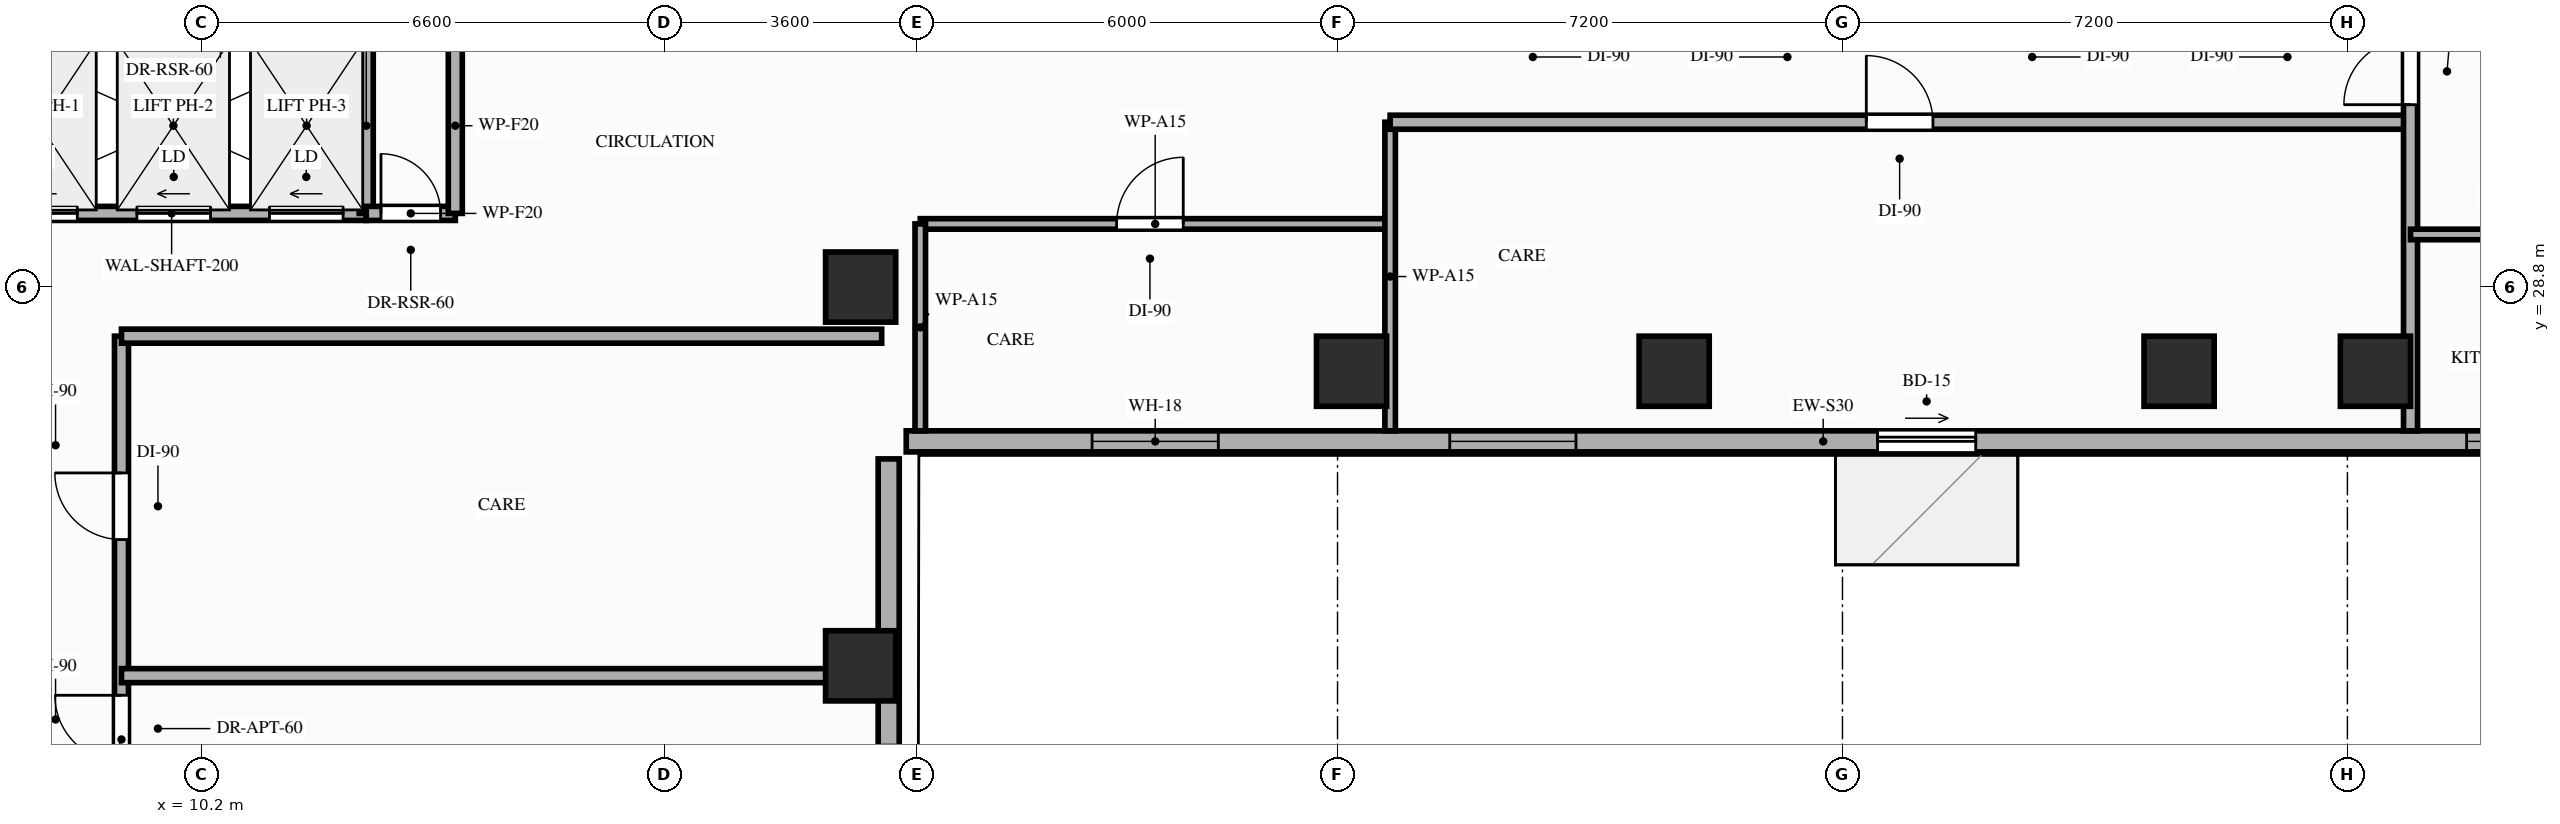
"""IFC4 building model, lengths in metres.
Left out: names, types, materials, properties, quantities, classifications, styles, units other than length and angle.
Written with IfcOpenShell. Run it as: python <this file> out.ifc"""

import sys

from ifc_helpers import new_model, si_unit, direction, frame, frame_2d, origin, origin_2d, place, context, subcontext, project, spatial, rectangle, extrude, element, fill, save


model = new_model("IFC4")
c1 = context("Model", 3, precision=1e-05, world=origin(), true_north=direction((0.0, 1.0)))
c2 = subcontext(c1, "Body", "Model", "MODEL_VIEW")
j1 = project(units=[si_unit("LENGTHUNIT", "METRE"), si_unit("PLANEANGLEUNIT", "RADIAN")], contexts=[c1])
p1 = place(None, origin())
s1 = spatial("IfcSite", under=j1, at=p1, CompositionType="ELEMENT")
p2 = place(p1, origin())
s2 = spatial("IfcBuilding", under=s1, at=p2, CompositionType="ELEMENT")
p3 = place(p2, frame((0.0, 0.0, 152.2)))
s3 = spatial("IfcBuildingStorey", under=s2, at=p3, CompositionType="ELEMENT", Elevation=152.2)
for number, where, z_axis, x_axis in (
    (1, (19.6, 23.4, 0.0), (0.0, 0.0, 1.0), (1.0, 0.0, 0.0)),
    (2, (19.6, 28.8, 0.0), (0.0, 0.0, 1.0), (1.0, 0.0, 0.0)),
    (3, (26.6, 27.6, 0.0), (0.0, 0.0, 1.0), (1.0, 0.0, 0.0)),
    (4, (31.2, 27.6, 0.0), (0.0, 0.0, 1.0), (1.0, 0.0, 0.0)),
    (5, (38.4, 27.6, 0.0), (0.0, 0.0, 1.0), (1.0, 0.0, 0.0)),
    (6, (41.2, 27.6, 0.0), (0.0, 0.0, 1.0), (1.0, 0.0, 0.0)),
):
    element("IfcColumn", number, at=place(p3, frame(where, z_axis=z_axis, x_axis=x_axis)), inside=s3, PredefinedType="COLUMN", context=c2, shape_type="SweptSolid", body=[
        extrude(rectangle(XDim=1.0, YDim=1.0, at=origin_2d()), origin(), (0.0, 0.0, 1.0), 3.8),
    ])
p4 = place(p3, frame((20.0, 8.8, 0.0), z_axis=(0.0, 0.0, 1.0), x_axis=(0.0, 1.0, 0.0)))
e7 = element("IfcWall", 7, at=p4, inside=s3, PredefinedType="STANDARD", context=c2, shape_type="SweptSolid", body=[
    extrude(rectangle(XDim=17.55, YDim=0.3, at=frame_2d((8.775, 0.0))), origin(), (0.0, 0.0, 1.0), 2.99),
])
p5 = place(p4, frame((11.67, 0.0, 0.85)))
e8 = element("IfcOpeningElement", 8, at=p5, cuts=e7, PredefinedType="OPENING", context=c2, shape_type="SweptSolid", body=[
    extrude(rectangle(XDim=1.8, YDim=1.75, at=frame_2d((0.9, 0.875))), frame((0.0, 0.16, 0.0), z_axis=(0.0, -1.0, 0.0), x_axis=(1.0, 0.0, 0.0)), (0.0, 0.0, 1.0), 0.32),
])
p6 = place(p4, frame((5.6, 0.0, 0.85)))
e9 = element("IfcOpeningElement", 9, at=p6, cuts=e7, PredefinedType="OPENING", context=c2, shape_type="SweptSolid", body=[
    extrude(rectangle(XDim=1.8, YDim=1.75, at=frame_2d((0.9, 0.875))), frame((0.0, 0.16, 0.0), z_axis=(0.0, -1.0, 0.0), x_axis=(1.0, 0.0, 0.0)), (0.0, 0.0, 1.0), 0.32),
])
p7 = place(p3, frame((20.25, 26.6, 0.0), z_axis=(0.0, 0.0, 1.0), x_axis=(1.0, 0.0, 0.0)))
e10 = element("IfcWall", 10, at=p7, inside=s3, PredefinedType="STANDARD", context=c2, shape_type="SweptSolid", body=[
    extrude(rectangle(XDim=26.15, YDim=0.3, at=frame_2d((13.075, 0.0))), origin(), (0.0, 0.0, 1.0), 3.56),
])
p8 = place(p7, frame((13.85, 0.0, 0.0)))
e11 = element("IfcOpeningElement", 11, at=p8, cuts=e10, PredefinedType="OPENING", context=c2, shape_type="SweptSolid", body=[
    extrude(rectangle(XDim=1.4, YDim=2.1, at=frame_2d((0.7, 1.05))), frame((0.0, 0.16, 0.0), z_axis=(0.0, -1.0, 0.0), x_axis=(1.0, 0.0, 0.0)), (0.0, 0.0, 1.0), 0.32),
])
p9 = place(p7, frame((2.65, 0.0, 0.85)))
e12 = element("IfcOpeningElement", 12, at=p9, cuts=e10, PredefinedType="OPENING", context=c2, shape_type="SweptSolid", body=[
    extrude(rectangle(XDim=1.8, YDim=1.75, at=frame_2d((0.9, 0.875))), frame((0.0, 0.16, 0.0), z_axis=(0.0, -1.0, 0.0), x_axis=(1.0, 0.0, 0.0)), (0.0, 0.0, 1.0), 0.32),
])
p10 = place(p7, frame((7.75, 0.0, 0.85)))
e13 = element("IfcOpeningElement", 13, at=p10, cuts=e10, PredefinedType="OPENING", context=c2, shape_type="SweptSolid", body=[
    extrude(rectangle(XDim=1.8, YDim=1.75, at=frame_2d((0.9, 0.875))), frame((0.0, 0.16, 0.0), z_axis=(0.0, -1.0, 0.0), x_axis=(1.0, 0.0, 0.0)), (0.0, 0.0, 1.0), 0.32),
])
p11 = place(p7, frame((22.25, 0.0, 0.85)))
e14 = element("IfcOpeningElement", 14, at=p11, cuts=e10, PredefinedType="OPENING", context=c2, shape_type="SweptSolid", body=[
    extrude(rectangle(XDim=1.8, YDim=1.75, at=frame_2d((0.9, 0.875))), frame((0.0, 0.16, 0.0), z_axis=(0.0, -1.0, 0.0), x_axis=(1.0, 0.0, 0.0)), (0.0, 0.0, 1.0), 0.32),
])
p12 = place(p3, frame((7.0, 29.85, 0.0), z_axis=(0.0, 0.0, 1.0), x_axis=(1.0, 0.0, 0.0)))
e15 = element("IfcWall", 15, at=p12, inside=s3, PredefinedType="MOVABLE", context=c2, shape_type="SweptSolid", body=[
    extrude(rectangle(XDim=5.55, YDim=0.2, at=frame_2d((2.775, 0.0))), origin(), (0.0, 0.0, 1.0), 3.56),
])
p13 = place(p12, frame((0.38, 0.0, 0.0)))
e16 = element("IfcOpeningElement", 16, at=p13, cuts=e15, PredefinedType="OPENING", context=c2, shape_type="SweptSolid", body=[
    extrude(rectangle(XDim=1.05, YDim=2.15, at=frame_2d((0.525, 1.075))), frame((0.0, 0.11, 0.0), z_axis=(0.0, -1.0, 0.0), x_axis=(1.0, 0.0, 0.0)), (0.0, 0.0, 1.0), 0.22),
])
p14 = place(p12, frame((2.28, 0.0, 0.0)))
e17 = element("IfcOpeningElement", 17, at=p14, cuts=e15, PredefinedType="OPENING", context=c2, shape_type="SweptSolid", body=[
    extrude(rectangle(XDim=1.05, YDim=2.15, at=frame_2d((0.525, 1.075))), frame((0.0, 0.11, 0.0), z_axis=(0.0, -1.0, 0.0), x_axis=(1.0, 0.0, 0.0)), (0.0, 0.0, 1.0), 0.22),
])
p15 = place(p12, frame((4.17, 0.0, 0.0)))
e18 = element("IfcOpeningElement", 18, at=p15, cuts=e15, PredefinedType="OPENING", context=c2, shape_type="SweptSolid", body=[
    extrude(rectangle(XDim=1.05, YDim=2.15, at=frame_2d((0.525, 1.075))), frame((0.0, 0.11, 0.0), z_axis=(0.0, -1.0, 0.0), x_axis=(1.0, 0.0, 0.0)), (0.0, 0.0, 1.0), 0.22),
])
p16 = place(p3, frame((12.55, 29.85, 0.0), z_axis=(0.0, 0.0, 1.0), x_axis=(0.0, 1.0, 0.0)))
e19 = element("IfcWall", 19, at=p16, inside=s3, PredefinedType="MOVABLE", context=c2, shape_type="SweptSolid", body=[
    extrude(rectangle(XDim=2.5, YDim=0.2, at=frame_2d((1.25, 0.0))), origin(), (0.0, 0.0, 1.0), 3.56),
])
p17 = place(p3, frame((12.55, 29.85, 0.0), z_axis=(0.0, 0.0, 1.0), x_axis=(1.0, 0.0, 0.0)))
e20 = element("IfcWall", 20, at=p17, inside=s3, PredefinedType="PARTITIONING", context=c2, shape_type="SweptSolid", body=[
    extrude(rectangle(XDim=1.27, YDim=0.2, at=frame_2d((0.635, 0.0))), origin(), (0.0, 0.0, 1.0), 3.56),
])
p18 = place(p17, frame((0.21, 0.0, 0.0)))
e21 = element("IfcOpeningElement", 21, at=p18, cuts=e20, PredefinedType="OPENING", context=c2, shape_type="SweptSolid", body=[
    extrude(rectangle(XDim=0.85, YDim=2.05, at=frame_2d((0.425, 1.025))), frame((0.0, 0.11, 0.0), z_axis=(0.0, -1.0, 0.0), x_axis=(1.0, 0.0, 0.0)), (0.0, 0.0, 1.0), 0.22),
])
p19 = place(p3, frame((13.82, 29.85, 0.0), z_axis=(0.0, 0.0, 1.0), x_axis=(0.0, 1.0, 0.0)))
e22 = element("IfcWall", 22, at=p19, inside=s3, PredefinedType="PARTITIONING", context=c2, shape_type="SweptSolid", body=[
    extrude(rectangle(XDim=2.5, YDim=0.2, at=frame_2d((1.25, 0.0))), origin(), (0.0, 0.0, 1.0), 3.56),
])
p20 = place(p3, frame((9.06, 16.6, 0.0), z_axis=(0.0, 0.0, 1.0), x_axis=(0.0, 1.0, 0.0)))
e23 = element("IfcWall", 23, at=p20, inside=s3, PredefinedType="PARTITIONING", context=c2, shape_type="SweptSolid", body=[
    extrude(rectangle(XDim=11.5, YDim=0.2, at=frame_2d((5.75, 0.0))), origin(), (0.0, 0.0, 1.0), 2.99),
])
p21 = place(p20, frame((0.45, 0.0, 0.0)))
e24 = element("IfcOpeningElement", 24, at=p21, cuts=e23, PredefinedType="OPENING", context=c2, shape_type="SweptSolid", body=[
    extrude(rectangle(XDim=0.95, YDim=2.15, at=frame_2d((0.475, 1.075))), frame((0.0, 0.11, 0.0), z_axis=(0.0, -1.0, 0.0), x_axis=(1.0, 0.0, 0.0)), (0.0, 0.0, 1.0), 0.22),
])
p22 = place(p20, frame((2.08, 0.0, 0.0)))
e25 = element("IfcOpeningElement", 25, at=p22, cuts=e23, PredefinedType="OPENING", context=c2, shape_type="SweptSolid", body=[
    extrude(rectangle(XDim=0.95, YDim=2.1, at=frame_2d((0.475, 1.05))), frame((0.0, 0.11, 0.0), z_axis=(0.0, -1.0, 0.0), x_axis=(1.0, 0.0, 0.0)), (0.0, 0.0, 1.0), 0.22),
])
p23 = place(p20, frame((8.6, 0.0, 0.0)))
e26 = element("IfcOpeningElement", 26, at=p23, cuts=e23, PredefinedType="OPENING", context=c2, shape_type="SweptSolid", body=[
    extrude(rectangle(XDim=0.95, YDim=2.15, at=frame_2d((0.475, 1.075))), frame((0.0, 0.11, 0.0), z_axis=(0.0, -1.0, 0.0), x_axis=(1.0, 0.0, 0.0)), (0.0, 0.0, 1.0), 0.22),
])
p24 = place(p20, frame((5.43, 0.0, 0.0)))
e27 = element("IfcOpeningElement", 27, at=p24, cuts=e23, PredefinedType="OPENING", context=c2, shape_type="SweptSolid", body=[
    extrude(rectangle(XDim=0.95, YDim=2.15, at=frame_2d((0.475, 1.075))), frame((0.0, 0.11, 0.0), z_axis=(0.0, -1.0, 0.0), x_axis=(1.0, 0.0, 0.0)), (0.0, 0.0, 1.0), 0.22),
])
p25 = place(p3, frame((9.06, 28.1, 0.0), z_axis=(0.0, 0.0, 1.0), x_axis=(1.0, 0.0, 0.0)))
e28 = element("IfcWall", 28, at=p25, inside=s3, PredefinedType="PARTITIONING", context=c2, shape_type="SweptSolid", body=[
    extrude(rectangle(XDim=10.84, YDim=0.2, at=frame_2d((5.42, 0.0))), origin(), (0.0, 0.0, 1.0), 2.99),
])
p26 = place(p3, frame((20.45, 29.7, 0.0), z_axis=(0.0, 0.0, 1.0), x_axis=(1.0, 0.0, 0.0)))
e29 = element("IfcWall", 29, at=p26, inside=s3, PredefinedType="PARTITIONING", context=c2, shape_type="SweptSolid", body=[
    extrude(rectangle(XDim=6.7, YDim=0.15, at=frame_2d((3.35, 0.0))), origin(), (0.0, 0.0, 1.0), 3.56),
])
p27 = place(p26, frame((2.8, 0.0, 0.0)))
e30 = element("IfcOpeningElement", 30, at=p27, cuts=e29, PredefinedType="OPENING", context=c2, shape_type="SweptSolid", body=[
    extrude(rectangle(XDim=0.95, YDim=2.15, at=frame_2d((0.475, 1.075))), frame((0.0, 0.085, 0.0), z_axis=(0.0, -1.0, 0.0), x_axis=(1.0, 0.0, 0.0)), (0.0, 0.0, 1.0), 0.17),
])
p28 = place(p3, frame((20.45, 26.75, 0.0), z_axis=(0.0, 0.0, 1.0), x_axis=(0.0, 1.0, 0.0)))
e31 = element("IfcWall", 31, at=p28, inside=s3, PredefinedType="PARTITIONING", context=c2, shape_type="SweptSolid", body=[
    extrude(rectangle(XDim=2.95, YDim=0.15, at=frame_2d((1.475, 0.0))), origin(), (0.0, 0.0, 1.0), 2.99),
])
p29 = place(p3, frame((27.15, 26.75, 0.0), z_axis=(0.0, 0.0, 1.0), x_axis=(0.0, 1.0, 0.0)))
e32 = element("IfcWall", 32, at=p29, inside=s3, PredefinedType="PARTITIONING", context=c2, shape_type="SweptSolid", body=[
    extrude(rectangle(XDim=4.4, YDim=0.15, at=frame_2d((2.2, 0.0))), origin(), (0.0, 0.0, 1.0), 2.99),
])
p30 = place(p3, frame((9.06, 23.26, 0.0), z_axis=(0.0, 0.0, 1.0), x_axis=(1.0, 0.0, 0.0)))
e33 = element("IfcWall", 33, at=p30, inside=s3, PredefinedType="PARTITIONING", context=c2, shape_type="SweptSolid", body=[
    extrude(rectangle(XDim=10.84, YDim=0.2, at=frame_2d((5.42, 0.0))), origin(), (0.0, 0.0, 1.0), 2.99),
])
p31 = place(p3, frame((27.15, 31.15, 0.0), z_axis=(0.0, 0.0, 1.0), x_axis=(1.0, 0.0, 0.0)))
e34 = element("IfcWall", 34, at=p31, inside=s3, PredefinedType="PARTITIONING", context=c2, shape_type="SweptSolid", body=[
    extrude(rectangle(XDim=14.55, YDim=0.2, at=frame_2d((7.275, 0.0))), origin(), (0.0, 0.0, 1.0), 2.99),
])
p32 = place(p31, frame((6.79, 0.0, 0.0)))
e35 = element("IfcOpeningElement", 35, at=p32, cuts=e34, PredefinedType="OPENING", context=c2, shape_type="SweptSolid", body=[
    extrude(rectangle(XDim=0.95, YDim=2.15, at=frame_2d((0.475, 1.075))), frame((0.0, 0.11, 0.0), z_axis=(0.0, -1.0, 0.0), x_axis=(1.0, 0.0, 0.0)), (0.0, 0.0, 1.0), 0.22),
])
p33 = place(p3, frame((41.7, 26.75, 0.0), z_axis=(0.0, 0.0, 1.0), x_axis=(0.0, 1.0, 0.0)))
e36 = element("IfcWall", 36, at=p33, inside=s3, PredefinedType="PARTITIONING", context=c2, shape_type="SweptSolid", body=[
    extrude(rectangle(XDim=15.45, YDim=0.2, at=frame_2d((7.725, 0.0))), origin(), (0.0, 0.0, 1.0), 2.99),
])
p34 = place(p33, frame((4.65, 0.0, 0.0)))
e37 = element("IfcOpeningElement", 37, at=p34, cuts=e36, PredefinedType="OPENING", context=c2, shape_type="SweptSolid", body=[
    extrude(rectangle(XDim=0.95, YDim=2.15, at=frame_2d((0.475, 1.075))), frame((0.0, 0.11, 0.0), z_axis=(0.0, -1.0, 0.0), x_axis=(1.0, 0.0, 0.0)), (0.0, 0.0, 1.0), 0.22),
])
p35 = place(p3, frame((41.7, 29.55, 0.0), z_axis=(0.0, 0.0, 1.0), x_axis=(1.0, 0.0, 0.0)))
e38 = element("IfcWall", 38, at=p35, inside=s3, PredefinedType="PARTITIONING", context=c2, shape_type="SweptSolid", body=[
    extrude(rectangle(XDim=4.8, YDim=0.15, at=frame_2d((2.4, 0.0))), origin(), (0.0, 0.0, 1.0), 2.99),
])
p36 = place(p35, frame((2.16, 0.0, 0.0)))
e39 = element("IfcOpeningElement", 39, at=p36, cuts=e38, PredefinedType="OPENING", context=c2, shape_type="SweptSolid", body=[
    extrude(rectangle(XDim=0.95, YDim=2.15, at=frame_2d((0.475, 1.075))), frame((0.0, 0.085, 0.0), z_axis=(0.0, -1.0, 0.0), x_axis=(1.0, 0.0, 0.0)), (0.0, 0.0, 1.0), 0.17),
])
p37 = place(p8, origin())
e40 = element("IfcDoor", 40, at=p37, inside=s3, OperationType="SLIDING_TO_RIGHT", PredefinedType="DOOR", context=c2, shape_type="SweptSolid", body=[
    extrude(rectangle(XDim=1.4, YDim=2.1, at=frame_2d((0.7, 1.05))), frame((0.0, 0.025, 0.0), z_axis=(0.0, -1.0, 0.0), x_axis=(1.0, 0.0, 0.0)), (0.0, 0.0, 1.0), 0.05),
])
fill(e11, e40)
p38 = place(p9, origin())
e41 = element("IfcWindow", 41, at=p38, inside=s3, PartitioningType="SINGLE_PANEL", PredefinedType="WINDOW", context=c2, shape_type="SweptSolid", body=[
    extrude(rectangle(XDim=1.8, YDim=1.75, at=frame_2d((0.9, 0.875))), frame((0.0, 0.03, 0.0), z_axis=(0.0, -1.0, 0.0), x_axis=(1.0, 0.0, 0.0)), (0.0, 0.0, 1.0), 0.06),
])
fill(e12, e41)
p39 = place(p10, origin())
e42 = element("IfcWindow", 42, at=p39, inside=s3, PartitioningType="SINGLE_PANEL", PredefinedType="WINDOW", context=c2, shape_type="SweptSolid", body=[
    extrude(rectangle(XDim=1.8, YDim=1.75, at=frame_2d((0.9, 0.875))), frame((0.0, 0.03, 0.0), z_axis=(0.0, -1.0, 0.0), x_axis=(1.0, 0.0, 0.0)), (0.0, 0.0, 1.0), 0.06),
])
fill(e13, e42)
p40 = place(p11, origin())
e43 = element("IfcWindow", 43, at=p40, inside=s3, PartitioningType="SINGLE_PANEL", PredefinedType="WINDOW", context=c2, shape_type="SweptSolid", body=[
    extrude(rectangle(XDim=1.8, YDim=1.75, at=frame_2d((0.9, 0.875))), frame((0.0, 0.03, 0.0), z_axis=(0.0, -1.0, 0.0), x_axis=(1.0, 0.0, 0.0)), (0.0, 0.0, 1.0), 0.06),
])
fill(e14, e43)
p41 = place(p13, origin())
e44 = element("IfcDoor", 44, at=p41, inside=s3, OperationType="SLIDING_TO_LEFT", PredefinedType="DOOR", context=c2, shape_type="SweptSolid", body=[
    extrude(rectangle(XDim=1.05, YDim=2.15, at=frame_2d((0.525, 1.075))), frame((0.0, 0.025, 0.0), z_axis=(0.0, -1.0, 0.0), x_axis=(1.0, 0.0, 0.0)), (0.0, 0.0, 1.0), 0.05),
])
fill(e16, e44)
p42 = place(p14, origin())
e45 = element("IfcDoor", 45, at=p42, inside=s3, OperationType="SLIDING_TO_LEFT", PredefinedType="DOOR", context=c2, shape_type="SweptSolid", body=[
    extrude(rectangle(XDim=1.05, YDim=2.15, at=frame_2d((0.525, 1.075))), frame((0.0, 0.025, 0.0), z_axis=(0.0, -1.0, 0.0), x_axis=(1.0, 0.0, 0.0)), (0.0, 0.0, 1.0), 0.05),
])
fill(e17, e45)
p43 = place(p15, origin())
e46 = element("IfcDoor", 46, at=p43, inside=s3, OperationType="SLIDING_TO_LEFT", PredefinedType="DOOR", context=c2, shape_type="SweptSolid", body=[
    extrude(rectangle(XDim=1.05, YDim=2.15, at=frame_2d((0.525, 1.075))), frame((0.0, 0.025, 0.0), z_axis=(0.0, -1.0, 0.0), x_axis=(1.0, 0.0, 0.0)), (0.0, 0.0, 1.0), 0.05),
])
fill(e18, e46)
p44 = place(p18, origin())
e47 = element("IfcDoor", 47, at=p44, inside=s3, OperationType="SINGLE_SWING_LEFT", PredefinedType="DOOR", context=c2, shape_type="SweptSolid", body=[
    extrude(rectangle(XDim=0.85, YDim=2.05, at=frame_2d((0.425, 1.025))), frame((0.0, 0.025, 0.0), z_axis=(0.0, -1.0, 0.0), x_axis=(1.0, 0.0, 0.0)), (0.0, 0.0, 1.0), 0.05),
])
fill(e21, e47)
p45 = place(p27, origin())
e48 = element("IfcDoor", 48, at=p45, inside=s3, OperationType="SINGLE_SWING_RIGHT", PredefinedType="DOOR", context=c2, shape_type="SweptSolid", body=[
    extrude(rectangle(XDim=0.95, YDim=2.15, at=frame_2d((0.475, 1.075))), frame((0.0, 0.025, 0.0), z_axis=(0.0, -1.0, 0.0), x_axis=(1.0, 0.0, 0.0)), (0.0, 0.0, 1.0), 0.05),
])
fill(e30, e48)
p46 = place(p23, origin())
e49 = element("IfcDoor", 49, at=p46, inside=s3, OperationType="SINGLE_SWING_RIGHT", PredefinedType="DOOR", context=c2, shape_type="SweptSolid", body=[
    extrude(rectangle(XDim=0.95, YDim=2.15, at=frame_2d((0.475, 1.075))), frame((0.0, 0.025, 0.0), z_axis=(0.0, -1.0, 0.0), x_axis=(1.0, 0.0, 0.0)), (0.0, 0.0, 1.0), 0.05),
])
fill(e26, e49)
p47 = place(p24, origin())
e50 = element("IfcDoor", 50, at=p47, inside=s3, OperationType="SINGLE_SWING_RIGHT", PredefinedType="DOOR", context=c2, shape_type="SweptSolid", body=[
    extrude(rectangle(XDim=0.95, YDim=2.15, at=frame_2d((0.475, 1.075))), frame((0.0, 0.025, 0.0), z_axis=(0.0, -1.0, 0.0), x_axis=(1.0, 0.0, 0.0)), (0.0, 0.0, 1.0), 0.05),
])
fill(e27, e50)
p48 = place(p34, origin())
e51 = element("IfcDoor", 51, at=p48, inside=s3, OperationType="SINGLE_SWING_LEFT", PredefinedType="DOOR", context=c2, shape_type="SweptSolid", body=[
    extrude(rectangle(XDim=0.95, YDim=2.15, at=frame_2d((0.475, 1.075))), frame((0.0, 0.025, 0.0), z_axis=(0.0, -1.0, 0.0), x_axis=(1.0, 0.0, 0.0)), (0.0, 0.0, 1.0), 0.05),
])
fill(e37, e51)
p49 = place(p32, origin())
e52 = element("IfcDoor", 52, at=p49, inside=s3, OperationType="SINGLE_SWING_LEFT", PredefinedType="DOOR", context=c2, shape_type="SweptSolid", body=[
    extrude(rectangle(XDim=0.95, YDim=2.15, at=frame_2d((0.475, 1.075))), frame((0.0, 0.025, 0.0), z_axis=(0.0, -1.0, 0.0), x_axis=(1.0, 0.0, 0.0)), (0.0, 0.0, 1.0), 0.05),
])
fill(e35, e52)
save(model, sys.argv[1])
